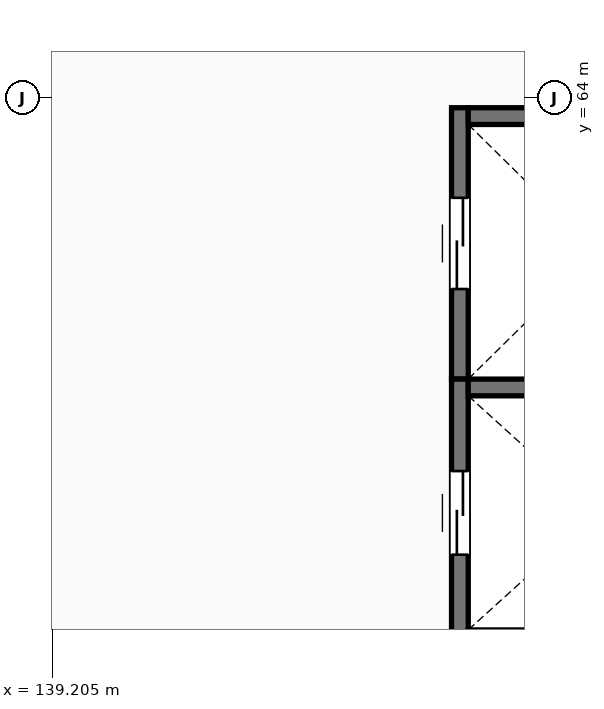
"""IFC4 building model, lengths in metres.
Left out: names, types, materials, properties, quantities, classifications, styles, units other than length and angle.
Written with IfcOpenShell. Run it as: python <this file> out.ifc"""

import sys

from ifc_helpers import new_model, si_unit, direction, frame, frame_2d, origin, place, context, subcontext, project, spatial, rectangle, extrude, element, fill, save


model = new_model("IFC4")
c1 = context("Model", 3, precision=1e-05, world=origin(), true_north=direction((0.0, 1.0)))
c2 = subcontext(c1, "Body", "Model", "MODEL_VIEW")
j1 = project(units=[si_unit("LENGTHUNIT", "METRE"), si_unit("PLANEANGLEUNIT", "RADIAN")], contexts=[c1])
p1 = place(None, origin())
s1 = spatial("IfcSite", under=j1, at=p1, CompositionType="ELEMENT")
p2 = place(p1, origin())
s2 = spatial("IfcBuilding", under=s1, at=p2, CompositionType="ELEMENT")
p3 = place(p2, frame((0.0, 0.0, 8.4)))
s3 = spatial("IfcBuildingStorey", under=s2, at=p3, CompositionType="ELEMENT", Elevation=8.4)
p4 = place(p3, frame((144.57, 60.3, 0.0), z_axis=(0.0, 0.0, 1.0), x_axis=(0.0, 1.0, 0.0)))
e1 = element("IfcWall", 1, at=p4, inside=s3, PredefinedType="SHEAR", context=c2, shape_type="SweptSolid", body=[
    extrude(rectangle(XDim=3.57, YDim=0.22, at=frame_2d((1.785, 0.0))), origin(), (0.0, 0.0, 1.0), 3.6),
])
p5 = place(p4, frame((1.185, 0.0, 0.0)))
e2 = element("IfcOpeningElement", 2, at=p5, cuts=e1, PredefinedType="OPENING", context=c2, shape_type="SweptSolid", body=[
    extrude(rectangle(XDim=1.2, YDim=2.2, at=frame_2d((0.6, 1.1))), frame((0.0, 0.12, 0.0), z_axis=(0.0, -1.0, 0.0), x_axis=(1.0, 0.0, 0.0)), (0.0, 0.0, 1.0), 0.24),
])
p6 = place(p3, frame((144.68, 63.76, 0.0), z_axis=(0.0, 0.0, 1.0), x_axis=(1.0, 0.0, 0.0)))
e3 = element("IfcWall", 3, at=p6, inside=s3, PredefinedType="SHEAR", context=c2, shape_type="SweptSolid", body=[
    extrude(rectangle(XDim=3.4, YDim=0.22, at=frame_2d((1.7, 0.0))), origin(), (0.0, 0.0, 1.0), 3.6),
])
p7 = place(p3, frame((144.57, 56.78, 0.0), z_axis=(0.0, 0.0, 1.0), x_axis=(0.0, 1.0, 0.0)))
e4 = element("IfcWall", 4, at=p7, inside=s3, PredefinedType="SHEAR", context=c2, shape_type="SweptSolid", body=[
    extrude(rectangle(XDim=3.52, YDim=0.22, at=frame_2d((1.76, 0.0))), origin(), (0.0, 0.0, 1.0), 3.6),
])
p8 = place(p7, frame((1.21, 0.0, 0.0)))
e5 = element("IfcOpeningElement", 5, at=p8, cuts=e4, PredefinedType="OPENING", context=c2, shape_type="SweptSolid", body=[
    extrude(rectangle(XDim=1.1, YDim=2.2, at=frame_2d((0.55, 1.1))), frame((0.0, 0.12, 0.0), z_axis=(0.0, -1.0, 0.0), x_axis=(1.0, 0.0, 0.0)), (0.0, 0.0, 1.0), 0.24),
])
p9 = place(p3, frame((144.68, 60.19, 0.0), z_axis=(0.0, 0.0, 1.0), x_axis=(1.0, 0.0, 0.0)))
e6 = element("IfcWall", 6, at=p9, inside=s3, PredefinedType="SHEAR", context=c2, shape_type="SweptSolid", body=[
    extrude(rectangle(XDim=3.4, YDim=0.22, at=frame_2d((1.7, 0.0))), origin(), (0.0, 0.0, 1.0), 3.6),
])
p10 = place(p5, origin())
e7 = element("IfcDoor", 7, at=p10, inside=s3, OperationType="DOUBLE_DOOR_SLIDING", PredefinedType="DOOR", context=c2, shape_type="SweptSolid", body=[
    extrude(rectangle(XDim=1.2, YDim=2.2, at=frame_2d((0.6, 1.1))), frame((0.0, 0.025, 0.0), z_axis=(0.0, -1.0, 0.0), x_axis=(1.0, 0.0, 0.0)), (0.0, 0.0, 1.0), 0.05),
])
fill(e2, e7)
p11 = place(p8, origin())
e8 = element("IfcDoor", 8, at=p11, inside=s3, OperationType="DOUBLE_DOOR_SLIDING", PredefinedType="DOOR", context=c2, shape_type="SweptSolid", body=[
    extrude(rectangle(XDim=1.1, YDim=2.2, at=frame_2d((0.55, 1.1))), frame((0.0, 0.025, 0.0), z_axis=(0.0, -1.0, 0.0), x_axis=(1.0, 0.0, 0.0)), (0.0, 0.0, 1.0), 0.05),
])
fill(e5, e8)
save(model, sys.argv[1])
